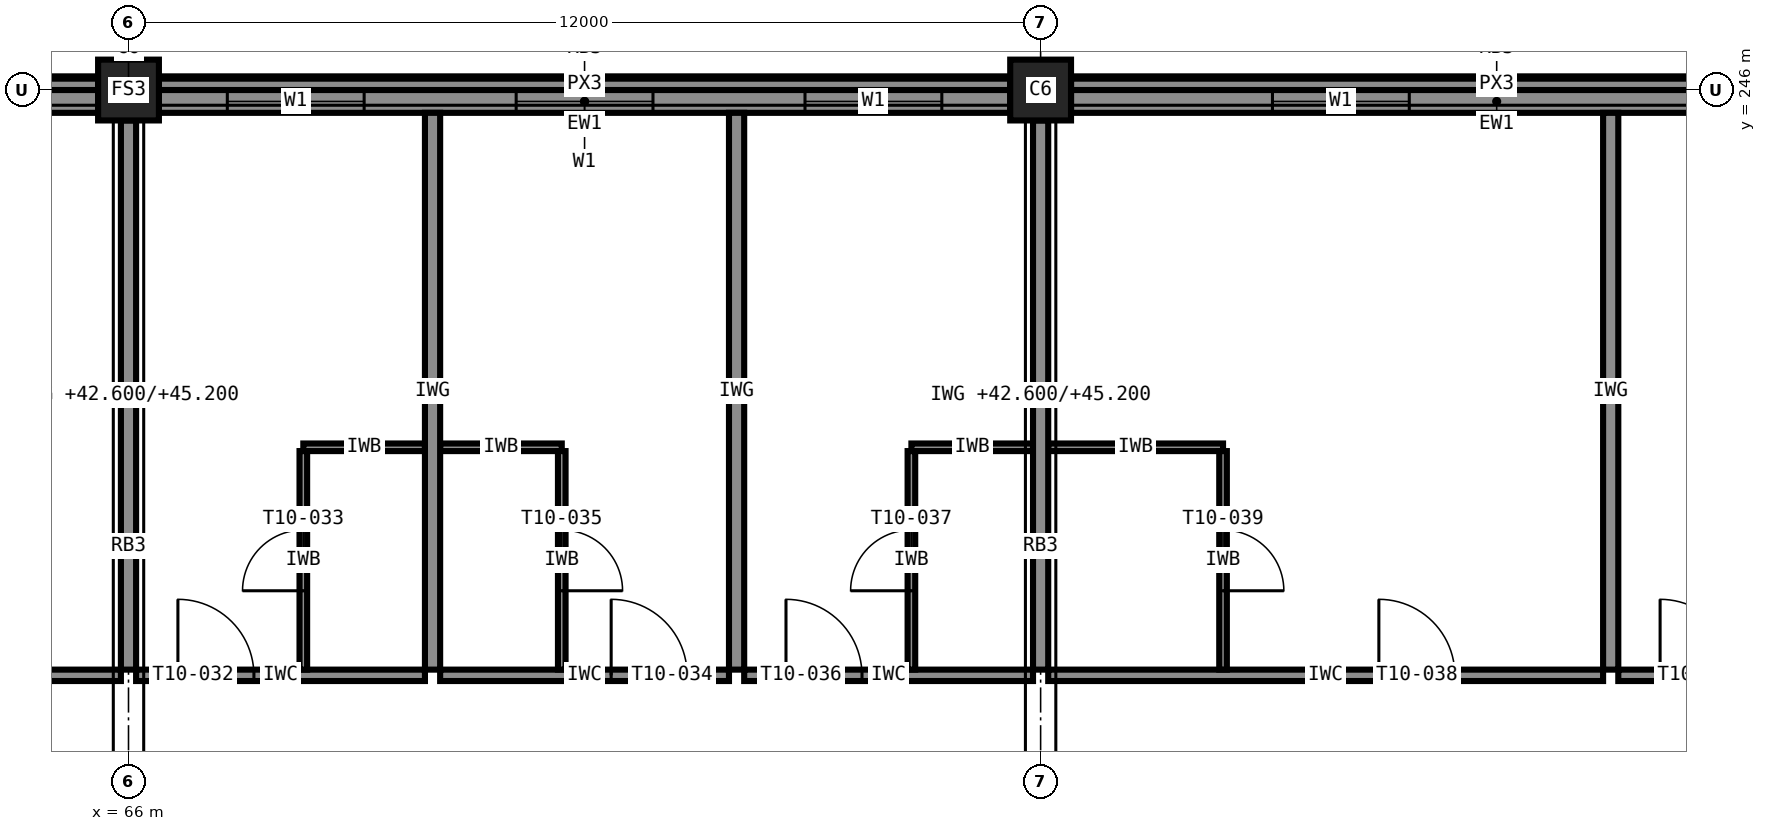
"""IFC4 building model, lengths in metres.
Left out: names, types, materials, properties, quantities, classifications, styles, units other than length and angle.
Written with IfcOpenShell. Run it as: python <this file> out.ifc"""

import sys

from ifc_helpers import new_model, si_unit, direction, frame, frame_2d, origin, origin_2d, place, context, subcontext, project, spatial, rectangle, extrude, element, fill, save


model = new_model("IFC4")
c1 = context("Model", 3, precision=1e-05, world=origin(), true_north=direction((0.0, 1.0)))
c2 = subcontext(c1, "Body", "Model", "MODEL_VIEW")
j1 = project(units=[si_unit("LENGTHUNIT", "METRE"), si_unit("PLANEANGLEUNIT", "RADIAN")], contexts=[c1])
p1 = place(None, origin())
s1 = spatial("IfcSite", under=j1, at=p1, CompositionType="ELEMENT")
p2 = place(p1, origin())
s2 = spatial("IfcBuilding", under=s1, at=p2, CompositionType="ELEMENT")
p3 = place(p2, frame((0.0, 0.0, 42.6)))
s3 = spatial("IfcBuildingStorey", under=s2, at=p3, CompositionType="ELEMENT", Elevation=42.6)
for number, where, z_axis, x_axis in (
    (1, (66.0, 246.0, 0.0), (0.0, 0.0, 1.0), (1.0, 0.0, 0.0)),
    (2, (78.0, 246.0, 0.0), (0.0, 0.0, 1.0), (1.0, 0.0, 0.0)),
):
    element("IfcColumn", number, at=place(p3, frame(where, z_axis=z_axis, x_axis=x_axis)), inside=s3, PredefinedType="COLUMN", context=c2, shape_type="SweptSolid", body=[
        extrude(rectangle(XDim=0.8, YDim=0.8, at=origin_2d()), origin(), (0.0, 0.0, 1.0), 3.6),
    ])
p4 = place(p3, frame((89.6, 245.85, 0.0), z_axis=(0.0, 0.0, 1.0), x_axis=(-1.0, 0.0, 0.0)))
e3 = element("IfcWall", 3, at=p4, inside=s3, PredefinedType="STANDARD", context=c2, shape_type="SweptSolid", body=[
    extrude(rectangle(XDim=11.2, YDim=0.3, at=frame_2d((5.6, 0.0))), origin(), (0.0, 0.0, 1.0), 2.6),
])
p5 = place(p4, frame((6.75, 0.0, 0.85)))
e4 = element("IfcOpeningElement", 4, at=p5, cuts=e3, PredefinedType="OPENING", context=c2, shape_type="SweptSolid", body=[
    extrude(rectangle(XDim=1.8, YDim=1.75, at=frame_2d((0.9, 0.875))), frame((0.0, 0.16, 0.0), z_axis=(0.0, -1.0, 0.0), x_axis=(1.0, 0.0, 0.0)), (0.0, 0.0, 1.0), 0.32),
])
p6 = place(p4, frame((1.2, 0.0, 0.85)))
e5 = element("IfcOpeningElement", 5, at=p6, cuts=e3, PredefinedType="OPENING", context=c2, shape_type="SweptSolid", body=[
    extrude(rectangle(XDim=1.8, YDim=1.75, at=frame_2d((0.9, 0.875))), frame((0.0, 0.16, 0.0), z_axis=(0.0, -1.0, 0.0), x_axis=(1.0, 0.0, 0.0)), (0.0, 0.0, 1.0), 0.32),
])
p7 = place(p3, frame((77.6, 245.85, 0.0), z_axis=(0.0, 0.0, 1.0), x_axis=(-1.0, 0.0, 0.0)))
e6 = element("IfcWall", 6, at=p7, inside=s3, PredefinedType="STANDARD", context=c2, shape_type="SweptSolid", body=[
    extrude(rectangle(XDim=11.2, YDim=0.3, at=frame_2d((5.6, 0.0))), origin(), (0.0, 0.0, 1.0), 2.6),
])
p8 = place(p7, frame((8.5, 0.0, 0.85)))
e7 = element("IfcOpeningElement", 7, at=p8, cuts=e6, PredefinedType="OPENING", context=c2, shape_type="SweptSolid", body=[
    extrude(rectangle(XDim=1.8, YDim=1.75, at=frame_2d((0.9, 0.875))), frame((0.0, 0.16, 0.0), z_axis=(0.0, -1.0, 0.0), x_axis=(1.0, 0.0, 0.0)), (0.0, 0.0, 1.0), 0.32),
])
p9 = place(p7, frame((4.7, 0.0, 0.85)))
e8 = element("IfcOpeningElement", 8, at=p9, cuts=e6, PredefinedType="OPENING", context=c2, shape_type="SweptSolid", body=[
    extrude(rectangle(XDim=1.8, YDim=1.75, at=frame_2d((0.9, 0.875))), frame((0.0, 0.16, 0.0), z_axis=(0.0, -1.0, 0.0), x_axis=(1.0, 0.0, 0.0)), (0.0, 0.0, 1.0), 0.32),
])
p10 = place(p7, frame((0.9, 0.0, 0.85)))
e9 = element("IfcOpeningElement", 9, at=p10, cuts=e6, PredefinedType="OPENING", context=c2, shape_type="SweptSolid", body=[
    extrude(rectangle(XDim=1.8, YDim=1.75, at=frame_2d((0.9, 0.875))), frame((0.0, 0.16, 0.0), z_axis=(0.0, -1.0, 0.0), x_axis=(1.0, 0.0, 0.0)), (0.0, 0.0, 1.0), 0.32),
])
p11 = place(p3, frame((65.6, 245.85, 0.0), z_axis=(0.0, 0.0, 1.0), x_axis=(-1.0, 0.0, 0.0)))
e10 = element("IfcWall", 10, at=p11, inside=s3, PredefinedType="STANDARD", context=c2, shape_type="SweptSolid", body=[
    extrude(rectangle(XDim=11.2, YDim=0.3, at=frame_2d((5.6, 0.0))), origin(), (0.0, 0.0, 1.0), 2.6),
])
p12 = place(p11, frame((7.5, 0.0, 0.85)))
e11 = element("IfcOpeningElement", 11, at=p12, cuts=e10, PredefinedType="OPENING", context=c2, shape_type="SweptSolid", body=[
    extrude(rectangle(XDim=1.8, YDim=1.75, at=frame_2d((0.9, 0.875))), frame((0.0, 0.16, 0.0), z_axis=(0.0, -1.0, 0.0), x_axis=(1.0, 0.0, 0.0)), (0.0, 0.0, 1.0), 0.32),
])
p13 = place(p11, frame((1.9, 0.0, 0.85)))
e12 = element("IfcOpeningElement", 12, at=p13, cuts=e10, PredefinedType="OPENING", context=c2, shape_type="SweptSolid", body=[
    extrude(rectangle(XDim=1.8, YDim=1.75, at=frame_2d((0.9, 0.875))), frame((0.0, 0.16, 0.0), z_axis=(0.0, -1.0, 0.0), x_axis=(1.0, 0.0, 0.0)), (0.0, 0.0, 1.0), 0.32),
])
for number, where, z_axis, x_axis in (
    (13, (89.6, 246.075, 3.4), (0.0, 0.0, 1.0), (-1.0, 0.0, 0.0)),
    (14, (77.6, 246.075, 3.4), (0.0, 0.0, 1.0), (-1.0, 0.0, 0.0)),
    (15, (65.6, 246.075, 3.4), (0.0, 0.0, 1.0), (-1.0, 0.0, 0.0)),
):
    element("IfcWall", number, at=place(p3, frame(where, z_axis=z_axis, x_axis=x_axis)), inside=s3, PredefinedType="STANDARD", context=c2, shape_type="SweptSolid", body=[
        extrude(rectangle(XDim=11.2, YDim=0.15, at=frame_2d((5.6, 0.0))), origin(), (0.0, 0.0, 1.0), 0.2),
    ])
p14 = place(p3, frame((60.1, 238.3, 0.0), z_axis=(0.0, 0.0, 1.0), x_axis=(1.0, 0.0, 0.0)))
e16 = element("IfcWall", 16, at=p14, inside=s3, PredefinedType="PARTITIONING", context=c2, shape_type="SweptSolid", body=[
    extrude(rectangle(XDim=5.8, YDim=0.15, at=frame_2d((2.9, 0.0))), origin(), (0.0, 0.0, 1.0), 3.4),
])
p15 = place(p14, frame((3.6, 0.0, 0.0)))
e17 = element("IfcOpeningElement", 17, at=p15, cuts=e16, PredefinedType="OPENING", context=c2, shape_type="SweptSolid", body=[
    extrude(rectangle(XDim=1.0, YDim=2.1, at=frame_2d((0.5, 1.05))), frame((0.0, 0.085, 0.0), z_axis=(0.0, -1.0, 0.0), x_axis=(1.0, 0.0, 0.0)), (0.0, 0.0, 1.0), 0.17),
])
p16 = place(p3, frame((66.1, 238.3, 0.0), z_axis=(0.0, 0.0, 1.0), x_axis=(1.0, 0.0, 0.0)))
e18 = element("IfcWall", 18, at=p16, inside=s3, PredefinedType="PARTITIONING", context=c2, shape_type="SweptSolid", body=[
    extrude(rectangle(XDim=3.8, YDim=0.15, at=frame_2d((1.9, 0.0))), origin(), (0.0, 0.0, 1.0), 3.4),
])
p17 = place(p16, frame((0.55, 0.0, 0.0)))
e19 = element("IfcOpeningElement", 19, at=p17, cuts=e18, PredefinedType="OPENING", context=c2, shape_type="SweptSolid", body=[
    extrude(rectangle(XDim=1.0, YDim=2.1, at=frame_2d((0.5, 1.05))), frame((0.0, 0.085, 0.0), z_axis=(0.0, -1.0, 0.0), x_axis=(1.0, 0.0, 0.0)), (0.0, 0.0, 1.0), 0.17),
])
p18 = place(p3, frame((68.3, 241.3, 0.0), z_axis=(0.0, 0.0, 1.0), x_axis=(1.0, 0.0, 0.0)))
e20 = element("IfcWall", 20, at=p18, inside=s3, PredefinedType="PARTITIONING", context=c2, shape_type="SweptSolid", body=[
    extrude(rectangle(XDim=1.6, YDim=0.1, at=frame_2d((0.8, 0.0))), origin(), (0.0, 0.0, 1.0), 3.4),
])
p19 = place(p3, frame((68.3, 238.375, 0.0), z_axis=(0.0, 0.0, 1.0), x_axis=(0.0, 1.0, 0.0)))
e21 = element("IfcWall", 21, at=p19, inside=s3, PredefinedType="PARTITIONING", context=c2, shape_type="SweptSolid", body=[
    extrude(rectangle(XDim=2.875, YDim=0.1, at=frame_2d((1.438, 0.0))), origin(), (0.0, 0.0, 1.0), 3.4),
])
p20 = place(p19, frame((1.038, 0.0, 0.0)))
e22 = element("IfcOpeningElement", 22, at=p20, cuts=e21, PredefinedType="OPENING", context=c2, shape_type="SweptSolid", body=[
    extrude(rectangle(XDim=0.8, YDim=2.1, at=frame_2d((0.4, 1.05))), frame((0.0, 0.06, 0.0), z_axis=(0.0, -1.0, 0.0), x_axis=(1.0, 0.0, 0.0)), (0.0, 0.0, 1.0), 0.12),
])
p21 = place(p3, frame((70.1, 238.3, 0.0), z_axis=(0.0, 0.0, 1.0), x_axis=(1.0, 0.0, 0.0)))
e23 = element("IfcWall", 23, at=p21, inside=s3, PredefinedType="PARTITIONING", context=c2, shape_type="SweptSolid", body=[
    extrude(rectangle(XDim=3.8, YDim=0.15, at=frame_2d((1.9, 0.0))), origin(), (0.0, 0.0, 1.0), 3.4),
])
p22 = place(p21, frame((2.25, 0.0, 0.0)))
e24 = element("IfcOpeningElement", 24, at=p22, cuts=e23, PredefinedType="OPENING", context=c2, shape_type="SweptSolid", body=[
    extrude(rectangle(XDim=1.0, YDim=2.1, at=frame_2d((0.5, 1.05))), frame((0.0, 0.085, 0.0), z_axis=(0.0, -1.0, 0.0), x_axis=(1.0, 0.0, 0.0)), (0.0, 0.0, 1.0), 0.17),
])
p23 = place(p3, frame((70.1, 241.3, 0.0), z_axis=(0.0, 0.0, 1.0), x_axis=(1.0, 0.0, 0.0)))
e25 = element("IfcWall", 25, at=p23, inside=s3, PredefinedType="PARTITIONING", context=c2, shape_type="SweptSolid", body=[
    extrude(rectangle(XDim=1.6, YDim=0.1, at=frame_2d((0.8, 0.0))), origin(), (0.0, 0.0, 1.0), 3.4),
])
p24 = place(p3, frame((71.7, 241.25, 0.0), z_axis=(0.0, 0.0, 1.0), x_axis=(0.0, -1.0, 0.0)))
e26 = element("IfcWall", 26, at=p24, inside=s3, PredefinedType="PARTITIONING", context=c2, shape_type="SweptSolid", body=[
    extrude(rectangle(XDim=2.875, YDim=0.1, at=frame_2d((1.438, 0.0))), origin(), (0.0, 0.0, 1.0), 3.4),
])
p25 = place(p24, frame((1.038, 0.0, 0.0)))
e27 = element("IfcOpeningElement", 27, at=p25, cuts=e26, PredefinedType="OPENING", context=c2, shape_type="SweptSolid", body=[
    extrude(rectangle(XDim=0.8, YDim=2.1, at=frame_2d((0.4, 1.05))), frame((0.0, 0.06, 0.0), z_axis=(0.0, -1.0, 0.0), x_axis=(1.0, 0.0, 0.0)), (0.0, 0.0, 1.0), 0.12),
])
p26 = place(p3, frame((74.1, 238.3, 0.0), z_axis=(0.0, 0.0, 1.0), x_axis=(1.0, 0.0, 0.0)))
e28 = element("IfcWall", 28, at=p26, inside=s3, PredefinedType="PARTITIONING", context=c2, shape_type="SweptSolid", body=[
    extrude(rectangle(XDim=3.8, YDim=0.15, at=frame_2d((1.9, 0.0))), origin(), (0.0, 0.0, 1.0), 3.4),
])
p27 = place(p26, frame((0.55, 0.0, 0.0)))
e29 = element("IfcOpeningElement", 29, at=p27, cuts=e28, PredefinedType="OPENING", context=c2, shape_type="SweptSolid", body=[
    extrude(rectangle(XDim=1.0, YDim=2.1, at=frame_2d((0.5, 1.05))), frame((0.0, 0.085, 0.0), z_axis=(0.0, -1.0, 0.0), x_axis=(1.0, 0.0, 0.0)), (0.0, 0.0, 1.0), 0.17),
])
p28 = place(p3, frame((76.3, 241.3, 0.0), z_axis=(0.0, 0.0, 1.0), x_axis=(1.0, 0.0, 0.0)))
e30 = element("IfcWall", 30, at=p28, inside=s3, PredefinedType="PARTITIONING", context=c2, shape_type="SweptSolid", body=[
    extrude(rectangle(XDim=1.6, YDim=0.1, at=frame_2d((0.8, 0.0))), origin(), (0.0, 0.0, 1.0), 3.4),
])
p29 = place(p3, frame((76.3, 238.375, 0.0), z_axis=(0.0, 0.0, 1.0), x_axis=(0.0, 1.0, 0.0)))
e31 = element("IfcWall", 31, at=p29, inside=s3, PredefinedType="PARTITIONING", context=c2, shape_type="SweptSolid", body=[
    extrude(rectangle(XDim=2.875, YDim=0.1, at=frame_2d((1.438, 0.0))), origin(), (0.0, 0.0, 1.0), 3.4),
])
p30 = place(p29, frame((1.038, 0.0, 0.0)))
e32 = element("IfcOpeningElement", 32, at=p30, cuts=e31, PredefinedType="OPENING", context=c2, shape_type="SweptSolid", body=[
    extrude(rectangle(XDim=0.8, YDim=2.1, at=frame_2d((0.4, 1.05))), frame((0.0, 0.06, 0.0), z_axis=(0.0, -1.0, 0.0), x_axis=(1.0, 0.0, 0.0)), (0.0, 0.0, 1.0), 0.12),
])
p31 = place(p3, frame((78.1, 238.3, 0.0), z_axis=(0.0, 0.0, 1.0), x_axis=(1.0, 0.0, 0.0)))
e33 = element("IfcWall", 33, at=p31, inside=s3, PredefinedType="PARTITIONING", context=c2, shape_type="SweptSolid", body=[
    extrude(rectangle(XDim=7.3, YDim=0.15, at=frame_2d((3.65, 0.0))), origin(), (0.0, 0.0, 1.0), 3.4),
])
p32 = place(p31, frame((4.35, 0.0, 0.0)))
e34 = element("IfcOpeningElement", 34, at=p32, cuts=e33, PredefinedType="OPENING", context=c2, shape_type="SweptSolid", body=[
    extrude(rectangle(XDim=1.0, YDim=2.1, at=frame_2d((0.5, 1.05))), frame((0.0, 0.085, 0.0), z_axis=(0.0, -1.0, 0.0), x_axis=(1.0, 0.0, 0.0)), (0.0, 0.0, 1.0), 0.17),
])
p33 = place(p3, frame((78.1, 241.3, 0.0), z_axis=(0.0, 0.0, 1.0), x_axis=(1.0, 0.0, 0.0)))
e35 = element("IfcWall", 35, at=p33, inside=s3, PredefinedType="PARTITIONING", context=c2, shape_type="SweptSolid", body=[
    extrude(rectangle(XDim=2.3, YDim=0.1, at=frame_2d((1.15, 0.0))), origin(), (0.0, 0.0, 1.0), 3.4),
])
p34 = place(p3, frame((80.4, 241.25, 0.0), z_axis=(0.0, 0.0, 1.0), x_axis=(0.0, -1.0, 0.0)))
e36 = element("IfcWall", 36, at=p34, inside=s3, PredefinedType="PARTITIONING", context=c2, shape_type="SweptSolid", body=[
    extrude(rectangle(XDim=2.875, YDim=0.1, at=frame_2d((1.438, 0.0))), origin(), (0.0, 0.0, 1.0), 3.4),
])
p35 = place(p34, frame((1.038, 0.0, 0.0)))
e37 = element("IfcOpeningElement", 37, at=p35, cuts=e36, PredefinedType="OPENING", context=c2, shape_type="SweptSolid", body=[
    extrude(rectangle(XDim=0.8, YDim=2.1, at=frame_2d((0.4, 1.05))), frame((0.0, 0.06, 0.0), z_axis=(0.0, -1.0, 0.0), x_axis=(1.0, 0.0, 0.0)), (0.0, 0.0, 1.0), 0.12),
])
p36 = place(p3, frame((85.6, 238.3, 0.0), z_axis=(0.0, 0.0, 1.0), x_axis=(1.0, 0.0, 0.0)))
e38 = element("IfcWall", 38, at=p36, inside=s3, PredefinedType="PARTITIONING", context=c2, shape_type="SweptSolid", body=[
    extrude(rectangle(XDim=4.2, YDim=0.15, at=frame_2d((2.1, 0.0))), origin(), (0.0, 0.0, 1.0), 3.4),
])
p37 = place(p36, frame((0.55, 0.0, 0.0)))
e39 = element("IfcOpeningElement", 39, at=p37, cuts=e38, PredefinedType="OPENING", context=c2, shape_type="SweptSolid", body=[
    extrude(rectangle(XDim=1.0, YDim=2.1, at=frame_2d((0.5, 1.05))), frame((0.0, 0.085, 0.0), z_axis=(0.0, -1.0, 0.0), x_axis=(1.0, 0.0, 0.0)), (0.0, 0.0, 1.0), 0.17),
])
p38 = place(p3, frame((66.0, 245.6, 0.0), z_axis=(0.0, 0.0, 1.0), x_axis=(0.0, -1.0, 0.0)))
e40 = element("IfcWall", 40, at=p38, inside=s3, PredefinedType="PARTITIONING", context=c2, shape_type="SweptSolid", body=[
    extrude(rectangle(XDim=7.225, YDim=0.2, at=frame_2d((3.613, 0.0))), origin(), (0.0, 0.0, 1.0), 2.6),
])
for number, where, z_axis, x_axis in (
    (41, (70.0, 245.7, 0.0), (0.0, 0.0, 1.0), (0.0, -1.0, 0.0)),
    (42, (74.0, 245.7, 0.0), (0.0, 0.0, 1.0), (0.0, -1.0, 0.0)),
):
    element("IfcWall", number, at=place(p3, frame(where, z_axis=z_axis, x_axis=x_axis)), inside=s3, PredefinedType="PARTITIONING", context=c2, shape_type="SweptSolid", body=[
        extrude(rectangle(XDim=7.325, YDim=0.2, at=frame_2d((3.663, 0.0))), origin(), (0.0, 0.0, 1.0), 3.4),
    ])
p39 = place(p3, frame((78.0, 245.6, 0.0), z_axis=(0.0, 0.0, 1.0), x_axis=(0.0, -1.0, 0.0)))
e43 = element("IfcWall", 43, at=p39, inside=s3, PredefinedType="PARTITIONING", context=c2, shape_type="SweptSolid", body=[
    extrude(rectangle(XDim=7.225, YDim=0.2, at=frame_2d((3.613, 0.0))), origin(), (0.0, 0.0, 1.0), 2.6),
])
p40 = place(p3, frame((85.5, 245.7, 0.0), z_axis=(0.0, 0.0, 1.0), x_axis=(0.0, -1.0, 0.0)))
e44 = element("IfcWall", 44, at=p40, inside=s3, PredefinedType="PARTITIONING", context=c2, shape_type="SweptSolid", body=[
    extrude(rectangle(XDim=7.325, YDim=0.2, at=frame_2d((3.663, 0.0))), origin(), (0.0, 0.0, 1.0), 3.4),
])
p41 = place(p5, origin())
e45 = element("IfcWindow", 45, at=p41, inside=s3, PartitioningType="SINGLE_PANEL", PredefinedType="WINDOW", context=c2, shape_type="SweptSolid", body=[
    extrude(rectangle(XDim=1.8, YDim=1.75, at=frame_2d((0.9, 0.875))), frame((0.0, 0.03, 0.0), z_axis=(0.0, -1.0, 0.0), x_axis=(1.0, 0.0, 0.0)), (0.0, 0.0, 1.0), 0.06),
])
fill(e4, e45)
p42 = place(p8, origin())
e46 = element("IfcWindow", 46, at=p42, inside=s3, PartitioningType="SINGLE_PANEL", PredefinedType="WINDOW", context=c2, shape_type="SweptSolid", body=[
    extrude(rectangle(XDim=1.8, YDim=1.75, at=frame_2d((0.9, 0.875))), frame((0.0, 0.03, 0.0), z_axis=(0.0, -1.0, 0.0), x_axis=(1.0, 0.0, 0.0)), (0.0, 0.0, 1.0), 0.06),
])
fill(e7, e46)
p43 = place(p9, origin())
e47 = element("IfcWindow", 47, at=p43, inside=s3, PartitioningType="SINGLE_PANEL", PredefinedType="WINDOW", context=c2, shape_type="SweptSolid", body=[
    extrude(rectangle(XDim=1.8, YDim=1.75, at=frame_2d((0.9, 0.875))), frame((0.0, 0.03, 0.0), z_axis=(0.0, -1.0, 0.0), x_axis=(1.0, 0.0, 0.0)), (0.0, 0.0, 1.0), 0.06),
])
fill(e8, e47)
p44 = place(p10, origin())
e48 = element("IfcWindow", 48, at=p44, inside=s3, PartitioningType="SINGLE_PANEL", PredefinedType="WINDOW", context=c2, shape_type="SweptSolid", body=[
    extrude(rectangle(XDim=1.8, YDim=1.75, at=frame_2d((0.9, 0.875))), frame((0.0, 0.03, 0.0), z_axis=(0.0, -1.0, 0.0), x_axis=(1.0, 0.0, 0.0)), (0.0, 0.0, 1.0), 0.06),
])
fill(e9, e48)
p45 = place(p17, origin())
e49 = element("IfcDoor", 49, at=p45, inside=s3, OperationType="SINGLE_SWING_LEFT", PredefinedType="DOOR", context=c2, shape_type="SweptSolid", body=[
    extrude(rectangle(XDim=1.0, YDim=2.1, at=frame_2d((0.5, 1.05))), frame((0.0, 0.025, 0.0), z_axis=(0.0, -1.0, 0.0), x_axis=(1.0, 0.0, 0.0)), (0.0, 0.0, 1.0), 0.05),
])
fill(e19, e49)
p46 = place(p20, origin())
e50 = element("IfcDoor", 50, at=p46, inside=s3, OperationType="SINGLE_SWING_LEFT", PredefinedType="DOOR", context=c2, shape_type="SweptSolid", body=[
    extrude(rectangle(XDim=0.8, YDim=2.1, at=frame_2d((0.4, 1.05))), frame((0.0, 0.025, 0.0), z_axis=(0.0, -1.0, 0.0), x_axis=(1.0, 0.0, 0.0)), (0.0, 0.0, 1.0), 0.05),
])
fill(e22, e50)
p47 = place(p22, origin())
e51 = element("IfcDoor", 51, at=p47, inside=s3, OperationType="SINGLE_SWING_LEFT", PredefinedType="DOOR", context=c2, shape_type="SweptSolid", body=[
    extrude(rectangle(XDim=1.0, YDim=2.1, at=frame_2d((0.5, 1.05))), frame((0.0, 0.025, 0.0), z_axis=(0.0, -1.0, 0.0), x_axis=(1.0, 0.0, 0.0)), (0.0, 0.0, 1.0), 0.05),
])
fill(e24, e51)
p48 = place(p25, origin())
e52 = element("IfcDoor", 52, at=p48, inside=s3, OperationType="SINGLE_SWING_RIGHT", PredefinedType="DOOR", context=c2, shape_type="SweptSolid", body=[
    extrude(rectangle(XDim=0.8, YDim=2.1, at=frame_2d((0.4, 1.05))), frame((0.0, 0.025, 0.0), z_axis=(0.0, -1.0, 0.0), x_axis=(1.0, 0.0, 0.0)), (0.0, 0.0, 1.0), 0.05),
])
fill(e27, e52)
p49 = place(p27, origin())
e53 = element("IfcDoor", 53, at=p49, inside=s3, OperationType="SINGLE_SWING_LEFT", PredefinedType="DOOR", context=c2, shape_type="SweptSolid", body=[
    extrude(rectangle(XDim=1.0, YDim=2.1, at=frame_2d((0.5, 1.05))), frame((0.0, 0.025, 0.0), z_axis=(0.0, -1.0, 0.0), x_axis=(1.0, 0.0, 0.0)), (0.0, 0.0, 1.0), 0.05),
])
fill(e29, e53)
p50 = place(p30, origin())
e54 = element("IfcDoor", 54, at=p50, inside=s3, OperationType="SINGLE_SWING_LEFT", PredefinedType="DOOR", context=c2, shape_type="SweptSolid", body=[
    extrude(rectangle(XDim=0.8, YDim=2.1, at=frame_2d((0.4, 1.05))), frame((0.0, 0.025, 0.0), z_axis=(0.0, -1.0, 0.0), x_axis=(1.0, 0.0, 0.0)), (0.0, 0.0, 1.0), 0.05),
])
fill(e32, e54)
p51 = place(p32, origin())
e55 = element("IfcDoor", 55, at=p51, inside=s3, OperationType="SINGLE_SWING_LEFT", PredefinedType="DOOR", context=c2, shape_type="SweptSolid", body=[
    extrude(rectangle(XDim=1.0, YDim=2.1, at=frame_2d((0.5, 1.05))), frame((0.0, 0.025, 0.0), z_axis=(0.0, -1.0, 0.0), x_axis=(1.0, 0.0, 0.0)), (0.0, 0.0, 1.0), 0.05),
])
fill(e34, e55)
p52 = place(p35, origin())
e56 = element("IfcDoor", 56, at=p52, inside=s3, OperationType="SINGLE_SWING_RIGHT", PredefinedType="DOOR", context=c2, shape_type="SweptSolid", body=[
    extrude(rectangle(XDim=0.8, YDim=2.1, at=frame_2d((0.4, 1.05))), frame((0.0, 0.025, 0.0), z_axis=(0.0, -1.0, 0.0), x_axis=(1.0, 0.0, 0.0)), (0.0, 0.0, 1.0), 0.05),
])
fill(e37, e56)
p53 = place(p37, origin())
e57 = element("IfcDoor", 57, at=p53, inside=s3, OperationType="SINGLE_SWING_LEFT", PredefinedType="DOOR", context=c2, shape_type="SweptSolid", body=[
    extrude(rectangle(XDim=1.0, YDim=2.1, at=frame_2d((0.5, 1.05))), frame((0.0, 0.025, 0.0), z_axis=(0.0, -1.0, 0.0), x_axis=(1.0, 0.0, 0.0)), (0.0, 0.0, 1.0), 0.05),
])
fill(e39, e57)
save(model, sys.argv[1])
